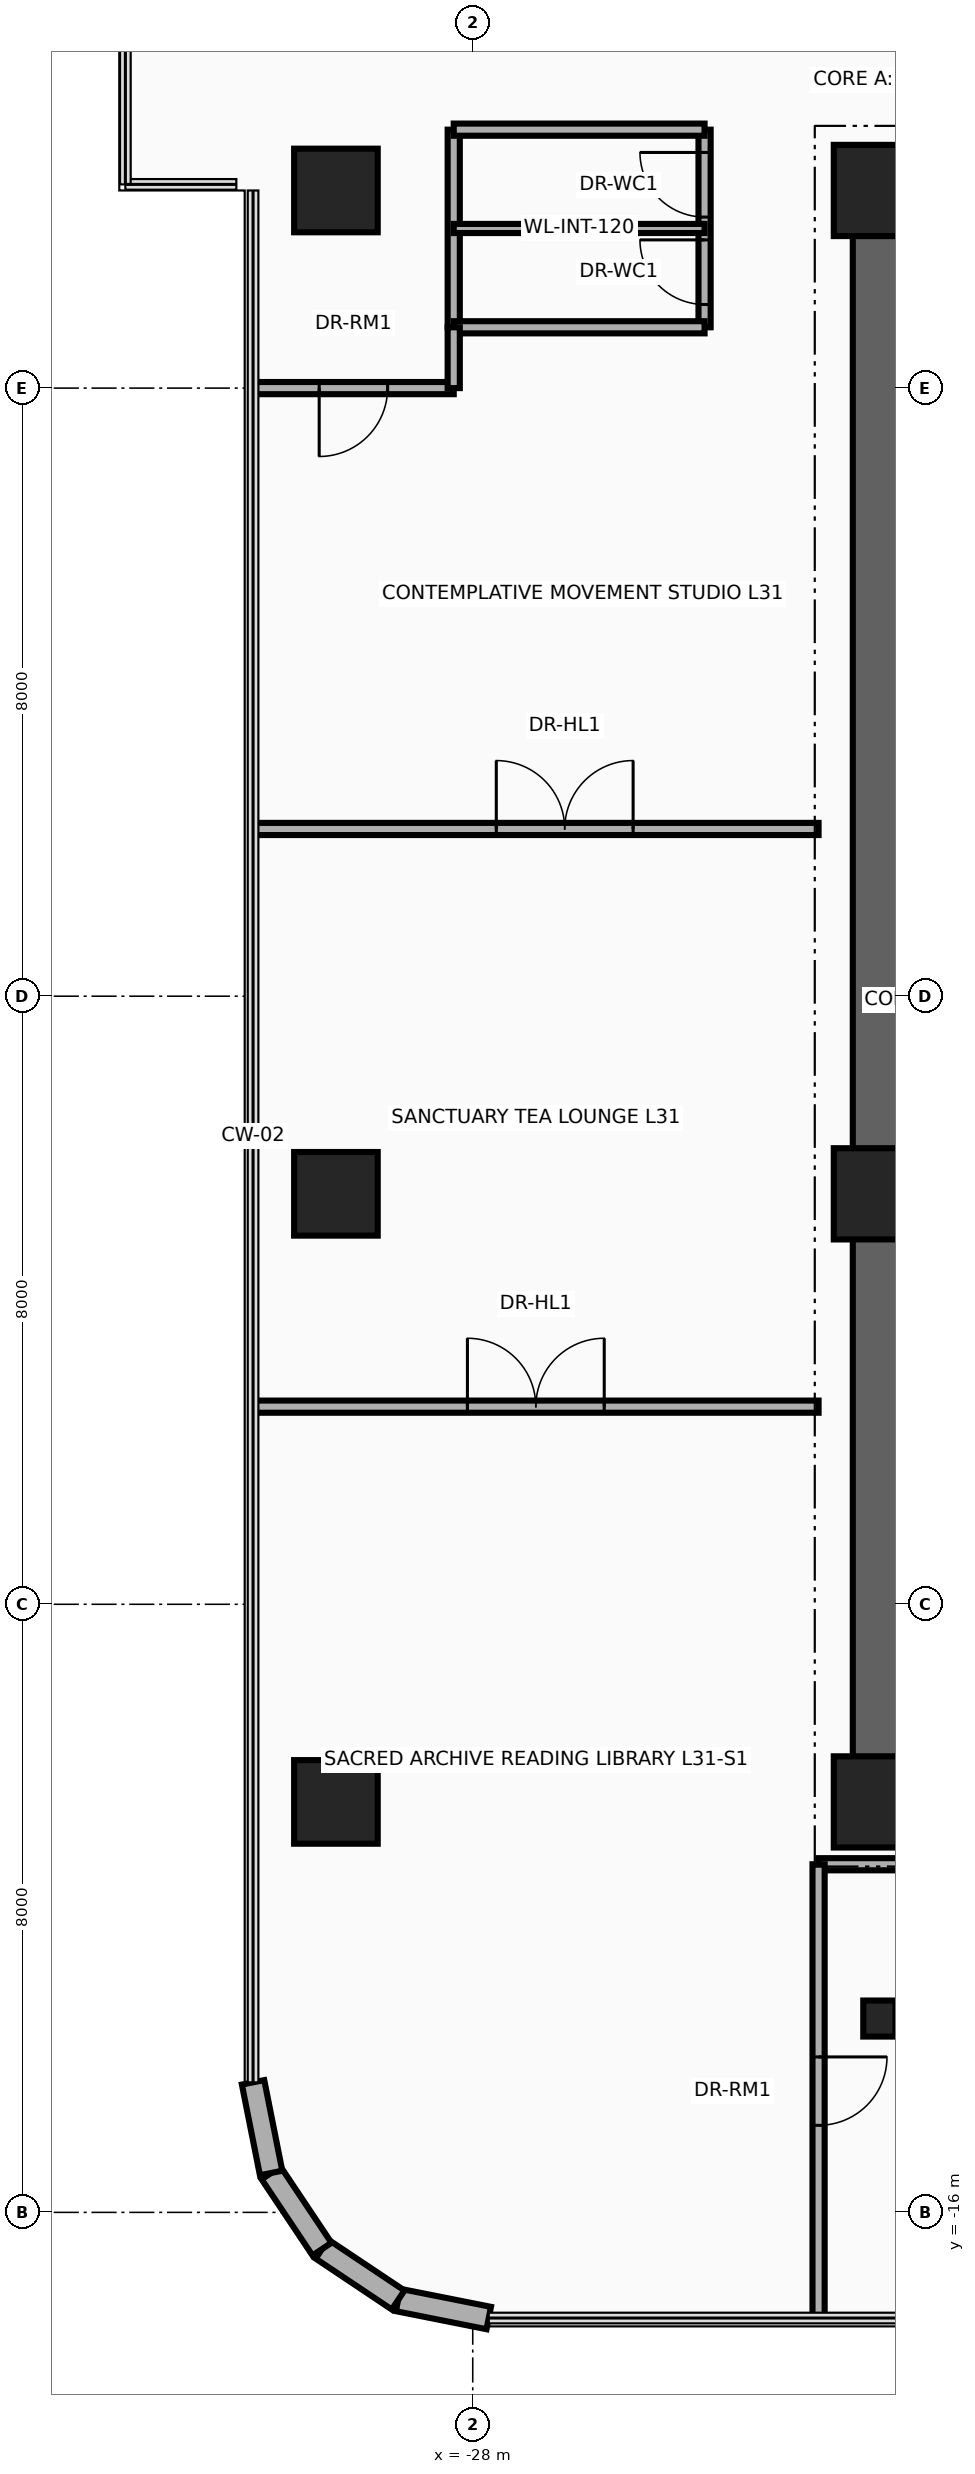
"""IFC4 building model, lengths in metres.
Left out: names, types, materials, properties, quantities, classifications, styles, units other than length and angle.
Written with IfcOpenShell. Run it as: python <this file> out.ifc"""

import sys

from ifc_helpers import new_model, si_unit, direction, frame, frame_2d, origin, origin_2d, place, context, subcontext, project, spatial, rectangle, circle, i_section, extrude, source, transform, mapped, element, fill, save


model = new_model("IFC4")
c1 = context("Model", 3, precision=1e-05, world=origin(), true_north=direction((0.0, 1.0)))
c2 = subcontext(c1, "Body", "Model", "MODEL_VIEW")
j1 = project(units=[si_unit("LENGTHUNIT", "METRE"), si_unit("PLANEANGLEUNIT", "RADIAN")], contexts=[c1])
p1 = place(None, origin())
s1 = spatial("IfcSite", under=j1, at=p1, CompositionType="ELEMENT")
p2 = place(p1, origin())
s2 = spatial("IfcBuilding", under=s1, at=p2, CompositionType="ELEMENT")
p3 = place(p2, frame((0.0, 0.0, 124.2)))
s3 = spatial("IfcBuildingStorey", under=s2, at=p3, CompositionType="ELEMENT", Elevation=124.2)
p4 = place(p3, frame((-22.65, -11.15, 0.0), z_axis=(0.0, 0.0, 1.0), x_axis=(0.0, 1.0, 0.0)))
e1 = element("IfcWall", 1, at=p4, inside=s3, PredefinedType="SHEAR", context=c2, shape_type="SweptSolid", body=[
    extrude(rectangle(XDim=22.3, YDim=0.7, at=frame_2d((11.15, 0.0))), origin(), (0.0, 0.0, 1.0), 3.46),
])
for number, where, z_axis, x_axis in (
    (2, (-22.65, 10.8, 0.0), (0.0, 0.0, 1.0), (1.0, 0.0, 0.0)),
    (3, (-22.65, -10.8, 0.0), (0.0, 0.0, 1.0), (1.0, 0.0, 0.0)),
):
    element("IfcWall", number, at=place(p3, frame(where, z_axis=z_axis, x_axis=x_axis)), inside=s3, PredefinedType="SHEAR", context=c2, shape_type="SweptSolid", body=[
        extrude(rectangle(XDim=10.25, YDim=0.7, at=frame_2d((5.125, 0.0))), origin(), (0.0, 0.0, 1.0), 3.46),
    ])
m1 = source(origin(), c2, "Body", "SweptSolid", [
    extrude(circle(Radius=0.55, at=origin_2d()), origin(), (0.0, 0.0, 1.0), 3.7),
])
p5 = place(p3, frame((-29.8, -10.6, 0.0), z_axis=(0.0, 0.0, 1.0), x_axis=(1.0, 0.0, 0.0)))
e4 = element("IfcColumn", 4, at=p5, inside=s3, PredefinedType="COLUMN", context=c2, shape_type="MappedRepresentation", body=[
    mapped(m1, transform((0.0, 0.0, 0.0), x_axis=(1.0, 0.0, 0.0), y_axis=(0.0, 1.0, 0.0), z_axis=(0.0, 0.0, 1.0), scale=1.0)),
])
m2 = source(origin(), c2, "Body", "SweptSolid", [
    extrude(rectangle(XDim=1.2, YDim=1.2, at=origin_2d()), origin(), (0.0, 0.0, 1.0), 3.7),
])
p6 = place(p3, frame((-22.65, -10.6, 0.0), z_axis=(0.0, 0.0, 1.0), x_axis=(1.0, 0.0, 0.0)))
e5 = element("IfcColumn", 5, at=p6, inside=s3, PredefinedType="COLUMN", context=c2, shape_type="MappedRepresentation", body=[
    mapped(m2, transform((0.0, 0.0, 0.0), x_axis=(1.0, 0.0, 0.0), y_axis=(0.0, 1.0, 0.0), z_axis=(0.0, 0.0, 1.0), scale=1.0)),
])
p7 = place(p3, frame((-29.8, -2.6, 0.0), z_axis=(0.0, 0.0, 1.0), x_axis=(1.0, 0.0, 0.0)))
e6 = element("IfcColumn", 6, at=p7, inside=s3, PredefinedType="COLUMN", context=c2, shape_type="MappedRepresentation", body=[
    mapped(m1, transform((0.0, 0.0, 0.0), x_axis=(1.0, 0.0, 0.0), y_axis=(0.0, 1.0, 0.0), z_axis=(0.0, 0.0, 1.0), scale=1.0)),
])
p8 = place(p3, frame((-22.65, -2.6, 0.0), z_axis=(0.0, 0.0, 1.0), x_axis=(1.0, 0.0, 0.0)))
e7 = element("IfcColumn", 7, at=p8, inside=s3, PredefinedType="COLUMN", context=c2, shape_type="MappedRepresentation", body=[
    mapped(m2, transform((0.0, 0.0, 0.0), x_axis=(1.0, 0.0, 0.0), y_axis=(0.0, 1.0, 0.0), z_axis=(0.0, 0.0, 1.0), scale=1.0)),
])
p9 = place(p3, frame((-29.8, 10.6, 0.0), z_axis=(0.0, 0.0, 1.0), x_axis=(1.0, 0.0, 0.0)))
e8 = element("IfcColumn", 8, at=p9, inside=s3, PredefinedType="COLUMN", context=c2, shape_type="MappedRepresentation", body=[
    mapped(m1, transform((0.0, 0.0, 0.0), x_axis=(1.0, 0.0, 0.0), y_axis=(0.0, 1.0, 0.0), z_axis=(0.0, 0.0, 1.0), scale=1.0)),
])
p10 = place(p3, frame((-22.65, 10.6, 0.0), z_axis=(0.0, 0.0, 1.0), x_axis=(1.0, 0.0, 0.0)))
e9 = element("IfcColumn", 9, at=p10, inside=s3, PredefinedType="COLUMN", context=c2, shape_type="MappedRepresentation", body=[
    mapped(m2, transform((0.0, 0.0, 0.0), x_axis=(1.0, 0.0, 0.0), y_axis=(0.0, 1.0, 0.0), z_axis=(0.0, 0.0, 1.0), scale=1.0)),
])
m3 = source(origin(), c2, "Body", "SweptSolid", [
    extrude(i_section(OverallWidth=0.424, OverallDepth=0.474, WebThickness=0.048, FlangeThickness=0.077, at=origin_2d()), origin(), (0.0, 0.0, 1.0), 3.7),
])
p11 = place(p3, frame((-22.65, -13.45, 0.0), z_axis=(0.0, 0.0, 1.0), x_axis=(1.0, 0.0, 0.0)))
e10 = element("IfcColumn", 10, at=p11, inside=s3, PredefinedType="COLUMN", context=c2, shape_type="MappedRepresentation", body=[
    mapped(m3, transform((0.0, 0.0, 0.0), x_axis=(1.0, 0.0, 0.0), y_axis=(0.0, 1.0, 0.0), z_axis=(0.0, 0.0, 1.0), scale=1.0)),
])
p12 = place(p3, frame((-27.789, -17.39, 0.0), z_axis=(0.0, 0.0, 1.0), x_axis=(-0.980804027463, 0.194996050505, 0.0)))
e11 = element("IfcWall", 11, at=p12, inside=s3, PredefinedType="SOLIDWALL", context=c2, shape_type="SweptSolid", body=[
    extrude(rectangle(XDim=1.216, YDim=0.3, at=frame_2d((0.608, 0.0))), origin(), (0.0, 0.0, 1.0), 3.46),
])
for number, where, z_axis, x_axis in (
    (12, (-28.982, -17.153, 0.0), (0.0, 0.0, 1.0), (-0.831, 0.556, 0.0)),
    (13, (-29.983, -16.483, 0.0), (0.0, 0.0, 1.0), (-0.556, 0.831, 0.0)),
):
    element("IfcWall", number, at=place(p3, frame(where, z_axis=z_axis, x_axis=x_axis)), inside=s3, PredefinedType="SOLIDWALL", context=c2, shape_type="SweptSolid", body=[
        extrude(rectangle(XDim=1.205, YDim=0.3, at=frame_2d((0.603, 0.0))), origin(), (0.0, 0.0, 1.0), 3.46),
    ])
p13 = place(p3, frame((-30.653, -15.482, 0.0), z_axis=(0.0, 0.0, 1.0), x_axis=(-0.194996050505, 0.980804027463, 0.0)))
e14 = element("IfcWall", 14, at=p13, inside=s3, PredefinedType="SOLIDWALL", context=c2, shape_type="SweptSolid", body=[
    extrude(rectangle(XDim=1.216, YDim=0.3, at=frame_2d((0.608, 0.0))), origin(), (0.0, 0.0, 1.0), 3.46),
])
p14 = place(p3, frame((-28.25, 8.8, 0.0), z_axis=(0.0, 0.0, 1.0), x_axis=(0.0, 1.0, 0.0)))
e15 = element("IfcWall", 15, at=p14, inside=s3, PredefinedType="PARTITIONING", context=c2, shape_type="SweptSolid", body=[
    extrude(rectangle(XDim=2.6, YDim=0.16, at=frame_2d((1.3, 0.0))), origin(), (0.0, 0.0, 1.0), 2.666),
])
p15 = place(p3, frame((-24.95, 8.8, 0.0), z_axis=(0.0, 0.0, 1.0), x_axis=(0.0, 1.0, 0.0)))
e16 = element("IfcWall", 16, at=p15, inside=s3, PredefinedType="PARTITIONING", context=c2, shape_type="SweptSolid", body=[
    extrude(rectangle(XDim=2.6, YDim=0.16, at=frame_2d((1.3, 0.0))), origin(), (0.0, 0.0, 1.0), 2.666),
])
p16 = place(p15, frame((0.3, 0.0, 0.0)))
e17 = element("IfcOpeningElement", 17, at=p16, cuts=e16, PredefinedType="OPENING", context=c2, shape_type="SweptSolid", body=[
    extrude(rectangle(XDim=0.85, YDim=2.1, at=frame_2d((0.425, 1.05))), frame((0.0, 0.095, 0.0), z_axis=(0.0, -1.0, 0.0), x_axis=(1.0, 0.0, 0.0)), (0.0, 0.0, 1.0), 0.19),
])
p17 = place(p15, frame((1.45, 0.0, 0.0)))
e18 = element("IfcOpeningElement", 18, at=p17, cuts=e16, PredefinedType="OPENING", context=c2, shape_type="SweptSolid", body=[
    extrude(rectangle(XDim=0.85, YDim=2.1, at=frame_2d((0.425, 1.05))), frame((0.0, 0.095, 0.0), z_axis=(0.0, -1.0, 0.0), x_axis=(1.0, 0.0, 0.0)), (0.0, 0.0, 1.0), 0.19),
])
for number, where, z_axis, x_axis in (
    (19, (-28.25, 8.8, 0.0), (0.0, 0.0, 1.0), (1.0, 0.0, 0.0)),
    (20, (-28.25, 11.4, 0.0), (0.0, 0.0, 1.0), (1.0, 0.0, 0.0)),
):
    element("IfcWall", number, at=place(p3, frame(where, z_axis=z_axis, x_axis=x_axis)), inside=s3, PredefinedType="PARTITIONING", context=c2, shape_type="SweptSolid", body=[
        extrude(rectangle(XDim=3.3, YDim=0.16, at=frame_2d((1.65, 0.0))), origin(), (0.0, 0.0, 1.0), 3.46),
    ])
p18 = place(p3, frame((-28.25, 10.1, 0.0), z_axis=(0.0, 0.0, 1.0), x_axis=(1.0, 0.0, 0.0)))
e21 = element("IfcWall", 21, at=p18, inside=s3, PredefinedType="PARTITIONING", context=c2, shape_type="SweptSolid", body=[
    extrude(rectangle(XDim=3.3, YDim=0.12, at=frame_2d((1.65, 0.0))), origin(), (0.0, 0.0, 1.0), 3.46),
])
p19 = place(p3, frame((-23.45, -11.42, 0.0), z_axis=(0.0, 0.0, 1.0), x_axis=(1.0, 0.0, 0.0)))
e22 = element("IfcWall", 22, at=p19, inside=s3, PredefinedType="PARTITIONING", context=c2, shape_type="SweptSolid", body=[
    extrude(rectangle(XDim=13.84, YDim=0.16, at=frame_2d((6.92, 0.0))), origin(), (0.0, 0.0, 1.0), 2.834),
])
p20 = place(p3, frame((-23.45, -17.39, 0.0), z_axis=(0.0, 0.0, 1.0), x_axis=(0.0, 1.0, 0.0)))
e23 = element("IfcWall", 23, at=p20, inside=s3, PredefinedType="PARTITIONING", context=c2, shape_type="SweptSolid", body=[
    extrude(rectangle(XDim=5.97, YDim=0.16, at=frame_2d((2.985, 0.0))), origin(), (0.0, 0.0, 1.0), 3.46),
])
p21 = place(p20, frame((2.535, 0.0, 0.0)))
e24 = element("IfcOpeningElement", 24, at=p21, cuts=e23, PredefinedType="OPENING", context=c2, shape_type="SweptSolid", body=[
    extrude(rectangle(XDim=0.9, YDim=2.1, at=frame_2d((0.45, 1.05))), frame((0.0, 0.095, 0.0), z_axis=(0.0, -1.0, 0.0), x_axis=(1.0, 0.0, 0.0)), (0.0, 0.0, 1.0), 0.19),
])
p22 = place(p3, frame((-30.89, -5.4, 0.0), z_axis=(0.0, 0.0, 1.0), x_axis=(1.0, 0.0, 0.0)))
e25 = element("IfcWall", 25, at=p22, inside=s3, PredefinedType="PARTITIONING", context=c2, shape_type="SweptSolid", body=[
    extrude(rectangle(XDim=7.44, YDim=0.16, at=frame_2d((3.72, 0.0))), origin(), (0.0, 0.0, 1.0), 2.896),
])
p23 = place(p22, frame((2.82, 0.0, 0.0)))
e26 = element("IfcOpeningElement", 26, at=p23, cuts=e25, PredefinedType="OPENING", context=c2, shape_type="SweptSolid", body=[
    extrude(rectangle(XDim=1.8, YDim=2.15, at=frame_2d((0.9, 1.075))), frame((0.0, 0.095, 0.0), z_axis=(0.0, -1.0, 0.0), x_axis=(1.0, 0.0, 0.0)), (0.0, 0.0, 1.0), 0.19),
])
p24 = place(p3, frame((-30.89, 8.0, 0.0), z_axis=(0.0, 0.0, 1.0), x_axis=(1.0, 0.0, 0.0)))
e27 = element("IfcWall", 27, at=p24, inside=s3, PredefinedType="PARTITIONING", context=c2, shape_type="SweptSolid", body=[
    extrude(rectangle(XDim=2.64, YDim=0.16, at=frame_2d((1.32, 0.0))), origin(), (0.0, 0.0, 1.0), 2.896),
])
p25 = place(p24, frame((0.87, 0.0, 0.0)))
e28 = element("IfcOpeningElement", 28, at=p25, cuts=e27, PredefinedType="OPENING", context=c2, shape_type="SweptSolid", body=[
    extrude(rectangle(XDim=0.9, YDim=2.1, at=frame_2d((0.45, 1.05))), frame((0.0, 0.095, 0.0), z_axis=(0.0, -1.0, 0.0), x_axis=(1.0, 0.0, 0.0)), (0.0, 0.0, 1.0), 0.19),
])
p26 = place(p3, frame((-28.25, 8.0, 0.0), z_axis=(0.0, 0.0, 1.0), x_axis=(0.0, 1.0, 0.0)))
e29 = element("IfcWall", 29, at=p26, inside=s3, PredefinedType="PARTITIONING", context=c2, shape_type="SweptSolid", body=[
    extrude(rectangle(XDim=0.8, YDim=0.16, at=frame_2d((0.4, 0.0))), origin(), (0.0, 0.0, 1.0), 2.988),
])
p27 = place(p3, frame((-30.89, 2.2, 0.0), z_axis=(0.0, 0.0, 1.0), x_axis=(1.0, 0.0, 0.0)))
e30 = element("IfcWall", 30, at=p27, inside=s3, PredefinedType="PARTITIONING", context=c2, shape_type="SweptSolid", body=[
    extrude(rectangle(XDim=7.44, YDim=0.16, at=frame_2d((3.72, 0.0))), origin(), (0.0, 0.0, 1.0), 2.896),
])
p28 = place(p27, frame((3.2, 0.0, 0.0)))
e31 = element("IfcOpeningElement", 31, at=p28, cuts=e30, PredefinedType="OPENING", context=c2, shape_type="SweptSolid", body=[
    extrude(rectangle(XDim=1.8, YDim=2.15, at=frame_2d((0.9, 1.075))), frame((0.0, 0.095, 0.0), z_axis=(0.0, -1.0, 0.0), x_axis=(1.0, 0.0, 0.0)), (0.0, 0.0, 1.0), 0.19),
])
p29 = place(p16, origin())
e32 = element("IfcDoor", 32, at=p29, inside=s3, OperationType="SINGLE_SWING_RIGHT", PredefinedType="DOOR", context=c2, shape_type="SweptSolid", body=[
    extrude(rectangle(XDim=0.85, YDim=2.1, at=frame_2d((0.425, 1.05))), frame((0.0, 0.025, 0.0), z_axis=(0.0, -1.0, 0.0), x_axis=(1.0, 0.0, 0.0)), (0.0, 0.0, 1.0), 0.05),
])
fill(e17, e32)
p30 = place(p17, origin())
e33 = element("IfcDoor", 33, at=p30, inside=s3, OperationType="SINGLE_SWING_LEFT", PredefinedType="DOOR", context=c2, shape_type="SweptSolid", body=[
    extrude(rectangle(XDim=0.85, YDim=2.1, at=frame_2d((0.425, 1.05))), frame((0.0, 0.025, 0.0), z_axis=(0.0, -1.0, 0.0), x_axis=(1.0, 0.0, 0.0)), (0.0, 0.0, 1.0), 0.05),
])
fill(e18, e33)
p31 = place(p23, origin())
e34 = element("IfcDoor", 34, at=p31, inside=s3, OperationType="DOUBLE_DOOR_SINGLE_SWING", PredefinedType="DOOR", context=c2, shape_type="SweptSolid", body=[
    extrude(rectangle(XDim=1.8, YDim=2.15, at=frame_2d((0.9, 1.075))), frame((0.0, 0.025, 0.0), z_axis=(0.0, -1.0, 0.0), x_axis=(1.0, 0.0, 0.0)), (0.0, 0.0, 1.0), 0.05),
])
fill(e26, e34)
p32 = place(p25, frame((0.9, 0.0, 0.0), z_axis=(0.0, 0.0, 1.0), x_axis=(-1.0, 0.0, 0.0)))
e35 = element("IfcDoor", 35, at=p32, inside=s3, OperationType="SINGLE_SWING_LEFT", PredefinedType="DOOR", context=c2, shape_type="SweptSolid", body=[
    extrude(rectangle(XDim=0.9, YDim=2.1, at=frame_2d((0.45, 1.05))), frame((0.0, 0.025, 0.0), z_axis=(0.0, -1.0, 0.0), x_axis=(1.0, 0.0, 0.0)), (0.0, 0.0, 1.0), 0.05),
])
fill(e28, e35)
p33 = place(p28, origin())
e36 = element("IfcDoor", 36, at=p33, inside=s3, OperationType="DOUBLE_DOOR_SINGLE_SWING", PredefinedType="DOOR", context=c2, shape_type="SweptSolid", body=[
    extrude(rectangle(XDim=1.8, YDim=2.15, at=frame_2d((0.9, 1.075))), frame((0.0, 0.025, 0.0), z_axis=(0.0, -1.0, 0.0), x_axis=(1.0, 0.0, 0.0)), (0.0, 0.0, 1.0), 0.05),
])
fill(e31, e36)
p34 = place(p21, frame((0.9, 0.0, 0.0), z_axis=(0.0, 0.0, 1.0), x_axis=(-1.0, 0.0, 0.0)))
e37 = element("IfcDoor", 37, at=p34, inside=s3, OperationType="SINGLE_SWING_LEFT", PredefinedType="DOOR", context=c2, shape_type="SweptSolid", body=[
    extrude(rectangle(XDim=0.9, YDim=2.1, at=frame_2d((0.45, 1.05))), frame((0.0, 0.025, 0.0), z_axis=(0.0, -1.0, 0.0), x_axis=(1.0, 0.0, 0.0)), (0.0, 0.0, 1.0), 0.05),
])
fill(e24, e37)
save(model, sys.argv[1])
